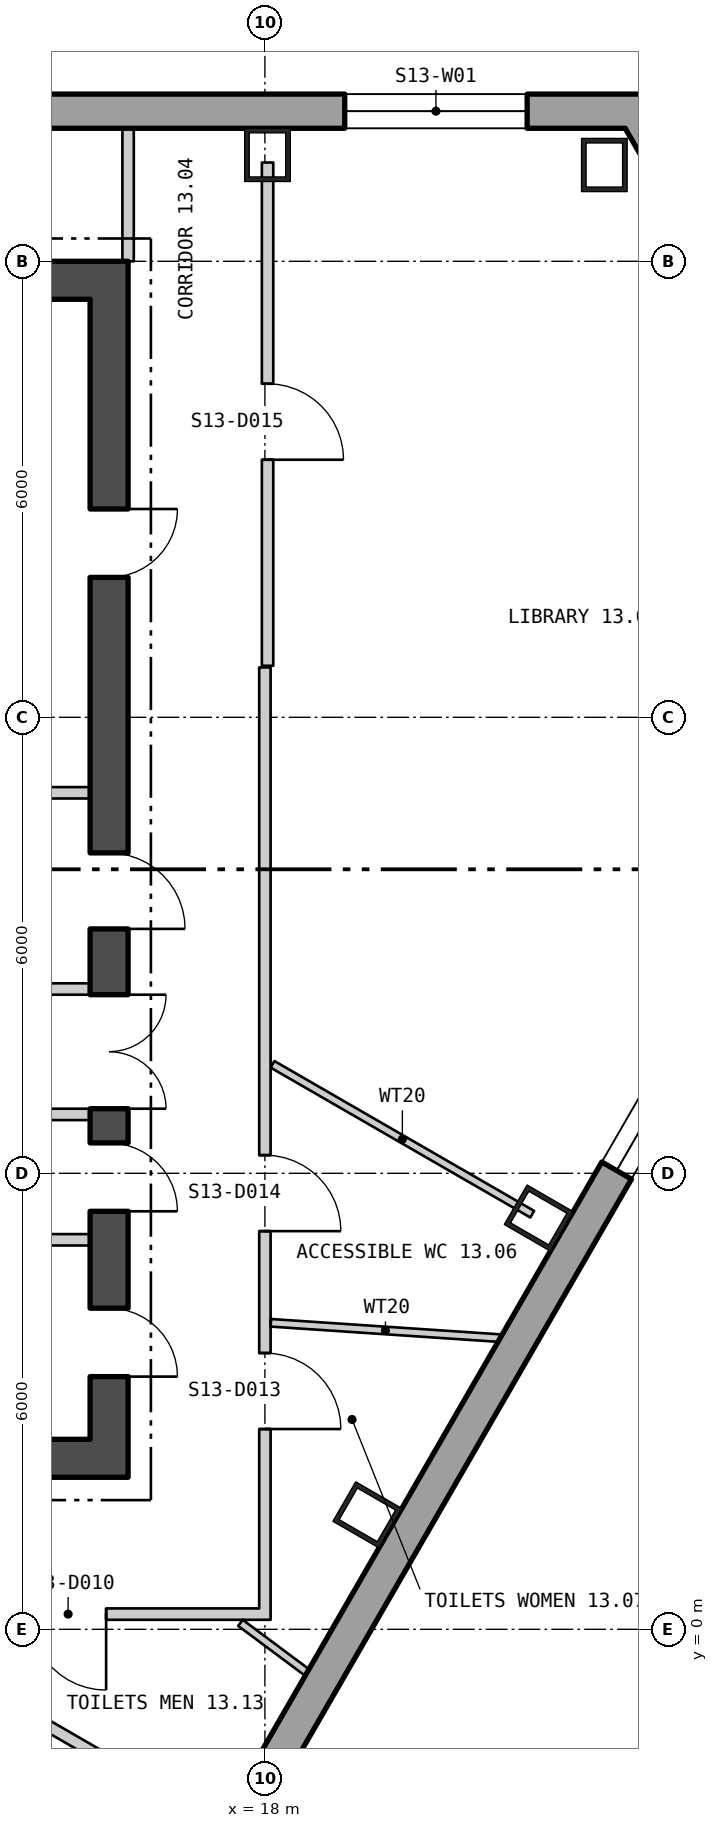
"""IFC4 building model, lengths in metres.
Left out: names, types, materials, properties, quantities, classifications, styles, units other than length and angle.
Written with IfcOpenShell. Run it as: python <this file> out.ifc"""

import sys

from ifc_helpers import new_model, si_unit, direction, frame, frame_2d, origin, origin_2d, place, context, subcontext, project, spatial, polyline, rectangle, hollow_rectangle, outline, extrude, element, fill, save


model = new_model("IFC4")
c1 = context("Model", 3, precision=1e-05, world=origin(), true_north=direction((0.0, 1.0)))
c2 = subcontext(c1, "Body", "Model", "MODEL_VIEW")
j1 = project(units=[si_unit("LENGTHUNIT", "METRE"), si_unit("PLANEANGLEUNIT", "RADIAN")], contexts=[c1])
p1 = place(None, origin())
s1 = spatial("IfcSite", under=j1, at=p1, CompositionType="ELEMENT")
p2 = place(p1, origin())
s2 = spatial("IfcBuilding", under=s1, at=p2, CompositionType="ELEMENT")
p3 = place(p2, frame((0.0, 0.0, 174.9)))
s3 = spatial("IfcBuildingStorey", under=s2, at=p3, CompositionType="ELEMENT", Elevation=174.9)
for number, where, z_axis, x_axis in (
    (1, (22.466, 19.267, 0.0), (0.0, 0.0, 1.0), (-1.0, 0.0, 0.0)),
    (2, (18.034, 19.4, 0.0), (0.0, 0.0, 1.0), (-1.0, 0.0, 0.0)),
    (3, (19.348, 1.506, 0.0), (0.0, 0.0, 1.0), (0.5, 0.866, 0.0)),
    (4, (21.603, 5.411, 0.0), (0.0, 0.0, 1.0), (0.5, 0.866, 0.0)),
):
    element("IfcColumn", number, at=place(p3, frame(where, z_axis=z_axis, x_axis=x_axis)), inside=s3, PredefinedType="COLUMN", context=c2, shape_type="SweptSolid", body=[
        extrude(hollow_rectangle(XDim=0.6, YDim=0.7, WallThickness=0.06, at=origin_2d()), origin(), (0.0, 0.0, 1.0), 3.9),
    ])
p4 = place(p3, frame((22.875, 19.975, -0.4), z_axis=(0.0, 0.0, 1.0), x_axis=(-1.0, 0.0, 0.0)))
e5 = element("IfcWall", 5, at=p4, inside=s3, PredefinedType="SOLIDWALL", context=c2, shape_type="SweptSolid", body=[
    extrude(outline(polyline([(-0.13, -0.225), (45.88, -0.225), (45.62, 0.225), (0.13, 0.225), (-0.13, -0.225)])), origin(), (0.0, 0.0, 1.0), 3.9),
])
p5 = place(p4, frame((1.425, 0.0, 1.3)))
e6 = element("IfcOpeningElement", 6, at=p5, cuts=e5, PredefinedType="OPENING", context=c2, shape_type="SweptSolid", body=[
    extrude(rectangle(XDim=2.4, YDim=2.0, at=frame_2d((1.2, 1.0))), frame((0.0, 0.235, 0.0), z_axis=(0.0, -1.0, 0.0), x_axis=(1.0, 0.0, 0.0)), (0.0, 0.0, 1.0), 0.47),
])
p6 = place(p4, frame((10.403, 0.0, 1.3)))
e7 = element("IfcOpeningElement", 7, at=p6, cuts=e5, PredefinedType="OPENING", context=c2, shape_type="SweptSolid", body=[
    extrude(rectangle(XDim=2.4, YDim=2.0, at=frame_2d((1.2, 1.0))), frame((0.0, 0.235, 0.0), z_axis=(0.0, -1.0, 0.0), x_axis=(1.0, 0.0, 0.0)), (0.0, 0.0, 1.0), 0.47),
])
p7 = place(p4, frame((14.912, 0.0, 1.3)))
e8 = element("IfcOpeningElement", 8, at=p7, cuts=e5, PredefinedType="OPENING", context=c2, shape_type="SweptSolid", body=[
    extrude(rectangle(XDim=2.4, YDim=2.0, at=frame_2d((1.2, 1.0))), frame((0.0, 0.235, 0.0), z_axis=(0.0, -1.0, 0.0), x_axis=(1.0, 0.0, 0.0)), (0.0, 0.0, 1.0), 0.47),
])
p8 = place(p4, frame((19.421, 0.0, 1.3)))
e9 = element("IfcOpeningElement", 9, at=p8, cuts=e5, PredefinedType="OPENING", context=c2, shape_type="SweptSolid", body=[
    extrude(rectangle(XDim=2.4, YDim=2.0, at=frame_2d((1.2, 1.0))), frame((0.0, 0.235, 0.0), z_axis=(0.0, -1.0, 0.0), x_axis=(1.0, 0.0, 0.0)), (0.0, 0.0, 1.0), 0.47),
])
p9 = place(p4, frame((23.929, 0.0, 1.3)))
e10 = element("IfcOpeningElement", 10, at=p9, cuts=e5, PredefinedType="OPENING", context=c2, shape_type="SweptSolid", body=[
    extrude(rectangle(XDim=2.4, YDim=2.0, at=frame_2d((1.2, 1.0))), frame((0.0, 0.235, 0.0), z_axis=(0.0, -1.0, 0.0), x_axis=(1.0, 0.0, 0.0)), (0.0, 0.0, 1.0), 0.47),
])
p10 = place(p4, frame((28.438, 0.0, 1.3)))
e11 = element("IfcOpeningElement", 11, at=p10, cuts=e5, PredefinedType="OPENING", context=c2, shape_type="SweptSolid", body=[
    extrude(rectangle(XDim=2.4, YDim=2.0, at=frame_2d((1.2, 1.0))), frame((0.0, 0.235, 0.0), z_axis=(0.0, -1.0, 0.0), x_axis=(1.0, 0.0, 0.0)), (0.0, 0.0, 1.0), 0.47),
])
p11 = place(p4, frame((32.947, 0.0, 1.3)))
e12 = element("IfcOpeningElement", 12, at=p11, cuts=e5, PredefinedType="OPENING", context=c2, shape_type="SweptSolid", body=[
    extrude(rectangle(XDim=2.4, YDim=2.0, at=frame_2d((1.2, 1.0))), frame((0.0, 0.235, 0.0), z_axis=(0.0, -1.0, 0.0), x_axis=(1.0, 0.0, 0.0)), (0.0, 0.0, 1.0), 0.47),
])
p12 = place(p4, frame((37.455, 0.0, 1.3)))
e13 = element("IfcOpeningElement", 13, at=p12, cuts=e5, PredefinedType="OPENING", context=c2, shape_type="SweptSolid", body=[
    extrude(rectangle(XDim=2.4, YDim=2.0, at=frame_2d((1.2, 1.0))), frame((0.0, 0.235, 0.0), z_axis=(0.0, -1.0, 0.0), x_axis=(1.0, 0.0, 0.0)), (0.0, 0.0, 1.0), 0.47),
])
p13 = place(p4, frame((41.925, 0.0, 1.3)))
e14 = element("IfcOpeningElement", 14, at=p13, cuts=e5, PredefinedType="OPENING", context=c2, shape_type="SweptSolid", body=[
    extrude(rectangle(XDim=2.4, YDim=2.0, at=frame_2d((1.2, 1.0))), frame((0.0, 0.235, 0.0), z_axis=(0.0, -1.0, 0.0), x_axis=(1.0, 0.0, 0.0)), (0.0, 0.0, 1.0), 0.47),
])
p14 = place(p3, frame((3.9, -26.401, -0.18), z_axis=(0.0, 0.0, 1.0), x_axis=(0.500000335318, 0.866025210188, 0.0)))
e15 = element("IfcWall", 15, at=p14, inside=s3, PredefinedType="SOLIDWALL", context=c2, shape_type="SweptSolid", body=[
    extrude(outline(polyline([(-0.13, -0.225), (45.88, -0.225), (45.62, 0.225), (0.13, 0.225), (-0.13, -0.225)])), origin(), (0.0, 0.0, 1.0), 3.68),
])
p15 = place(p14, frame((1.425, 0.0, 1.08)))
e16 = element("IfcOpeningElement", 16, at=p15, cuts=e15, PredefinedType="OPENING", context=c2, shape_type="SweptSolid", body=[
    extrude(rectangle(XDim=2.4, YDim=2.0, at=frame_2d((1.2, 1.0))), frame((0.0, 0.235, 0.0), z_axis=(0.0, -1.0, 0.0), x_axis=(1.0, 0.0, 0.0)), (0.0, 0.0, 1.0), 0.47),
])
p16 = place(p14, frame((5.895, 0.0, 1.08)))
e17 = element("IfcOpeningElement", 17, at=p16, cuts=e15, PredefinedType="OPENING", context=c2, shape_type="SweptSolid", body=[
    extrude(rectangle(XDim=2.4, YDim=2.0, at=frame_2d((1.2, 1.0))), frame((0.0, 0.235, 0.0), z_axis=(0.0, -1.0, 0.0), x_axis=(1.0, 0.0, 0.0)), (0.0, 0.0, 1.0), 0.47),
])
p17 = place(p14, frame((10.403, 0.0, 1.08)))
e18 = element("IfcOpeningElement", 18, at=p17, cuts=e15, PredefinedType="OPENING", context=c2, shape_type="SweptSolid", body=[
    extrude(rectangle(XDim=2.4, YDim=2.0, at=frame_2d((1.2, 1.0))), frame((0.0, 0.235, 0.0), z_axis=(0.0, -1.0, 0.0), x_axis=(1.0, 0.0, 0.0)), (0.0, 0.0, 1.0), 0.47),
])
p18 = place(p14, frame((14.912, 0.0, 1.08)))
e19 = element("IfcOpeningElement", 19, at=p18, cuts=e15, PredefinedType="OPENING", context=c2, shape_type="SweptSolid", body=[
    extrude(rectangle(XDim=2.4, YDim=2.0, at=frame_2d((1.2, 1.0))), frame((0.0, 0.235, 0.0), z_axis=(0.0, -1.0, 0.0), x_axis=(1.0, 0.0, 0.0)), (0.0, 0.0, 1.0), 0.47),
])
p19 = place(p14, frame((19.421, 0.0, 1.08)))
e20 = element("IfcOpeningElement", 20, at=p19, cuts=e15, PredefinedType="OPENING", context=c2, shape_type="SweptSolid", body=[
    extrude(rectangle(XDim=2.4, YDim=2.0, at=frame_2d((1.2, 1.0))), frame((0.0, 0.235, 0.0), z_axis=(0.0, -1.0, 0.0), x_axis=(1.0, 0.0, 0.0)), (0.0, 0.0, 1.0), 0.47),
])
p20 = place(p14, frame((23.929, 0.0, 1.08)))
e21 = element("IfcOpeningElement", 21, at=p20, cuts=e15, PredefinedType="OPENING", context=c2, shape_type="SweptSolid", body=[
    extrude(rectangle(XDim=2.4, YDim=2.0, at=frame_2d((1.2, 1.0))), frame((0.0, 0.235, 0.0), z_axis=(0.0, -1.0, 0.0), x_axis=(1.0, 0.0, 0.0)), (0.0, 0.0, 1.0), 0.47),
])
p21 = place(p14, frame((37.455, 0.0, 1.08)))
e22 = element("IfcOpeningElement", 22, at=p21, cuts=e15, PredefinedType="OPENING", context=c2, shape_type="SweptSolid", body=[
    extrude(rectangle(XDim=2.4, YDim=2.0, at=frame_2d((1.2, 1.0))), frame((0.0, 0.235, 0.0), z_axis=(0.0, -1.0, 0.0), x_axis=(1.0, 0.0, 0.0)), (0.0, 0.0, 1.0), 0.47),
])
p22 = place(p14, frame((41.925, 0.0, 1.08)))
e23 = element("IfcOpeningElement", 23, at=p22, cuts=e15, PredefinedType="OPENING", context=c2, shape_type="SweptSolid", body=[
    extrude(rectangle(XDim=2.4, YDim=2.0, at=frame_2d((1.2, 1.0))), frame((0.0, 0.235, 0.0), z_axis=(0.0, -1.0, 0.0), x_axis=(1.0, 0.0, 0.0)), (0.0, 0.0, 1.0), 0.47),
])
p23 = place(p3, frame((26.771, 13.218, -0.4), z_axis=(0.0, 0.0, 1.0), x_axis=(-0.500003961136, 0.86602311681, 0.0)))
e24 = element("IfcWall", 24, at=p23, inside=s3, PredefinedType="SOLIDWALL", context=c2, shape_type="SweptSolid", body=[
    extrude(outline(polyline([(-0.13, -0.225), (7.93, -0.225), (7.67, 0.225), (0.13, 0.225), (-0.13, -0.225)])), origin(), (0.0, 0.0, 1.0), 3.9),
])
p24 = place(p23, frame((1.254, 0.0, 1.3)))
e25 = element("IfcOpeningElement", 25, at=p24, cuts=e24, PredefinedType="OPENING", context=c2, shape_type="SweptSolid", body=[
    extrude(rectangle(XDim=1.8, YDim=2.0, at=frame_2d((0.9, 1.0))), frame((0.0, 0.235, 0.0), z_axis=(0.0, -1.0, 0.0), x_axis=(1.0, 0.0, 0.0)), (0.0, 0.0, 1.0), 0.47),
])
p25 = place(p23, frame((4.746, 0.0, 1.3)))
e26 = element("IfcOpeningElement", 26, at=p25, cuts=e24, PredefinedType="OPENING", context=c2, shape_type="SweptSolid", body=[
    extrude(rectangle(XDim=1.8, YDim=2.0, at=frame_2d((0.9, 1.0))), frame((0.0, 0.235, 0.0), z_axis=(0.0, -1.0, 0.0), x_axis=(1.0, 0.0, 0.0)), (0.0, 0.0, 1.0), 0.47),
])
p26 = place(p3, frame((-16.2, 2.25, 0.0), z_axis=(0.0, 0.0, 1.0), x_axis=(1.0, 0.0, 0.0)))
e27 = element("IfcWall", 27, at=p26, inside=s3, PredefinedType="SHEAR", context=c2, shape_type="SweptSolid", body=[
    extrude(rectangle(XDim=32.4, YDim=0.5, at=frame_2d((16.2, 0.0))), origin(), (0.0, 0.0, 1.0), 3.7),
])
p27 = place(p26, frame((10.7, 0.0, 0.0)))
e28 = element("IfcOpeningElement", 28, at=p27, cuts=e27, PredefinedType="OPENING", context=c2, shape_type="SweptSolid", body=[
    extrude(rectangle(XDim=1.8, YDim=2.4, at=frame_2d((0.9, 1.2))), frame((0.0, 0.26, 0.0), z_axis=(0.0, -1.0, 0.0), x_axis=(1.0, 0.0, 0.0)), (0.0, 0.0, 1.0), 0.52),
])
p28 = place(p26, frame((20.7, 0.0, 0.0)))
e29 = element("IfcOpeningElement", 29, at=p28, cuts=e27, PredefinedType="OPENING", context=c2, shape_type="SweptSolid", body=[
    extrude(rectangle(XDim=1.8, YDim=2.4, at=frame_2d((0.9, 1.2))), frame((0.0, 0.26, 0.0), z_axis=(0.0, -1.0, 0.0), x_axis=(1.0, 0.0, 0.0)), (0.0, 0.0, 1.0), 0.52),
])
p29 = place(p3, frame((-16.2, 17.75, 0.0), z_axis=(0.0, 0.0, 1.0), x_axis=(1.0, 0.0, 0.0)))
e30 = element("IfcWall", 30, at=p29, inside=s3, PredefinedType="SHEAR", context=c2, shape_type="SweptSolid", body=[
    extrude(rectangle(XDim=32.4, YDim=0.5, at=frame_2d((16.2, 0.0))), origin(), (0.0, 0.0, 1.0), 3.7),
])
p30 = place(p3, frame((15.95, 2.5, 0.0), z_axis=(0.0, 0.0, 1.0), x_axis=(0.0, 1.0, 0.0)))
e31 = element("IfcWall", 31, at=p30, inside=s3, PredefinedType="SHEAR", context=c2, shape_type="SweptSolid", body=[
    extrude(rectangle(XDim=15.0, YDim=0.5, at=frame_2d((7.5, 0.0))), origin(), (0.0, 0.0, 1.0), 3.7),
])
p31 = place(p30, frame((4.35, 0.0, 0.0)))
e32 = element("IfcOpeningElement", 32, at=p31, cuts=e31, PredefinedType="OPENING", context=c2, shape_type="SweptSolid", body=[
    extrude(rectangle(XDim=1.5, YDim=2.1, at=frame_2d((0.75, 1.05))), frame((0.0, 0.26, 0.0), z_axis=(0.0, -1.0, 0.0), x_axis=(1.0, 0.0, 0.0)), (0.0, 0.0, 1.0), 0.52),
])
p32 = place(p30, frame((0.825, 0.0, 0.0)))
e33 = element("IfcOpeningElement", 33, at=p32, cuts=e31, PredefinedType="OPENING", context=c2, shape_type="SweptSolid", body=[
    extrude(rectangle(XDim=0.9, YDim=2.1, at=frame_2d((0.45, 1.05))), frame((0.0, 0.26, 0.0), z_axis=(0.0, -1.0, 0.0), x_axis=(1.0, 0.0, 0.0)), (0.0, 0.0, 1.0), 0.52),
])
p33 = place(p30, frame((3.0, 0.0, 0.0)))
e34 = element("IfcOpeningElement", 34, at=p33, cuts=e31, PredefinedType="OPENING", context=c2, shape_type="SweptSolid", body=[
    extrude(rectangle(XDim=0.9, YDim=2.1, at=frame_2d((0.45, 1.05))), frame((0.0, 0.26, 0.0), z_axis=(0.0, -1.0, 0.0), x_axis=(1.0, 0.0, 0.0)), (0.0, 0.0, 1.0), 0.52),
])
p34 = place(p30, frame((6.716, 0.0, 0.0)))
e35 = element("IfcOpeningElement", 35, at=p34, cuts=e31, PredefinedType="OPENING", context=c2, shape_type="SweptSolid", body=[
    extrude(rectangle(XDim=1.0, YDim=2.1, at=frame_2d((0.5, 1.05))), frame((0.0, 0.26, 0.0), z_axis=(0.0, -1.0, 0.0), x_axis=(1.0, 0.0, 0.0)), (0.0, 0.0, 1.0), 0.52),
])
p35 = place(p30, frame((11.341, 0.0, 0.0)))
e36 = element("IfcOpeningElement", 36, at=p35, cuts=e31, PredefinedType="OPENING", context=c2, shape_type="SweptSolid", body=[
    extrude(rectangle(XDim=0.9, YDim=2.1, at=frame_2d((0.45, 1.05))), frame((0.0, 0.26, 0.0), z_axis=(0.0, -1.0, 0.0), x_axis=(1.0, 0.0, 0.0)), (0.0, 0.0, 1.0), 0.52),
])
for number, where, z_axis, x_axis in (
    (37, (14.5, 6.775, 0.0), (0.0, 0.0, 1.0), (1.0, 0.0, 0.0)),
    (38, (14.5, 8.425, 0.0), (0.0, 0.0, 1.0), (1.0, 0.0, 0.0)),
    (39, (14.5, 5.125, 0.0), (0.0, 0.0, 1.0), (1.0, 0.0, 0.0)),
    (40, (14.5, 11.007, 0.0), (0.0, 0.0, 1.0), (1.0, 0.0, 0.0)),
):
    element("IfcWall", number, at=place(p3, frame(where, z_axis=z_axis, x_axis=x_axis)), inside=s3, PredefinedType="PARTITIONING", context=c2, shape_type="SweptSolid", body=[
        extrude(rectangle(XDim=1.2, YDim=0.15, at=frame_2d((0.6, 0.0))), origin(), (0.0, 0.0, 1.0), 3.7),
    ])
p36 = place(p3, frame((7.02, 0.2, 0.0), z_axis=(0.0, 0.0, 1.0), x_axis=(1.0, 0.0, 0.0)))
e41 = element("IfcWall", 41, at=p36, inside=s3, PredefinedType="PARTITIONING", context=c2, shape_type="SweptSolid", body=[
    extrude(rectangle(XDim=10.905, YDim=0.15, at=frame_2d((5.452, 0.0))), origin(), (0.0, 0.0, 1.0), 3.7),
])
p37 = place(p36, frame((7.891, 0.0, 0.0)))
e42 = element("IfcOpeningElement", 42, at=p37, cuts=e41, PredefinedType="OPENING", context=c2, shape_type="SweptSolid", body=[
    extrude(rectangle(XDim=1.0, YDim=2.1, at=frame_2d((0.5, 1.05))), frame((0.0, 0.085, 0.0), z_axis=(0.0, -1.0, 0.0), x_axis=(1.0, 0.0, 0.0)), (0.0, 0.0, 1.0), 0.17),
])
p38 = place(p3, frame((12.836, 0.06, 0.0), z_axis=(0.0, 0.0, 1.0), x_axis=(0.866088799389, -0.499890179513, 0.0)))
e43 = element("IfcWall", 43, at=p38, inside=s3, PredefinedType="PARTITIONING", context=c2, shape_type="SweptSolid", body=[
    extrude(rectangle(XDim=4.817, YDim=0.15, at=frame_2d((2.409, 0.0))), origin(), (0.0, 0.0, 1.0), 3.7),
])
p39 = place(p3, frame((16.2, 18.0, 0.0), z_axis=(0.0, 0.0, 1.0), x_axis=(0.0, 1.0, 0.0)))
e44 = element("IfcWall", 44, at=p39, inside=s3, PredefinedType="PARTITIONING", context=c2, shape_type="SweptSolid", body=[
    extrude(rectangle(XDim=1.75, YDim=0.15, at=frame_2d((0.875, 0.0))), origin(), (0.0, 0.0, 1.0), 3.7),
])
p40 = place(p3, frame((17.678, 0.085, 0.0), z_axis=(0.0, 0.0, 1.0), x_axis=(0.8020803948, -0.597216075033, 0.0)))
e45 = element("IfcWall", 45, at=p40, inside=s3, PredefinedType="PARTITIONING", context=c2, shape_type="SweptSolid", body=[
    extrude(rectangle(XDim=1.093, YDim=0.1, at=frame_2d((0.547, 0.0))), origin(), (0.0, 0.0, 1.0), 3.7),
])
p41 = place(p3, frame((18.0, 0.125, 0.0), z_axis=(0.0, 0.0, 1.0), x_axis=(0.0, 1.0, 0.0)))
e46 = element("IfcWall", 46, at=p41, inside=s3, PredefinedType="PARTITIONING", context=c2, shape_type="SweptSolid", body=[
    extrude(rectangle(XDim=12.531, YDim=0.15, at=frame_2d((6.266, 0.0))), origin(), (0.0, 0.0, 1.0), 3.7),
])
p42 = place(p41, frame((2.51, 0.0, 0.0)))
e47 = element("IfcOpeningElement", 47, at=p42, cuts=e46, PredefinedType="OPENING", context=c2, shape_type="SweptSolid", body=[
    extrude(rectangle(XDim=1.0, YDim=2.1, at=frame_2d((0.5, 1.05))), frame((0.0, 0.085, 0.0), z_axis=(0.0, -1.0, 0.0), x_axis=(1.0, 0.0, 0.0)), (0.0, 0.0, 1.0), 0.17),
])
p43 = place(p41, frame((5.114, 0.0, 0.0)))
e48 = element("IfcOpeningElement", 48, at=p43, cuts=e46, PredefinedType="OPENING", context=c2, shape_type="SweptSolid", body=[
    extrude(rectangle(XDim=1.0, YDim=2.1, at=frame_2d((0.5, 1.05))), frame((0.0, 0.085, 0.0), z_axis=(0.0, -1.0, 0.0), x_axis=(1.0, 0.0, 0.0)), (0.0, 0.0, 1.0), 0.17),
])
p44 = place(p3, frame((18.035, 12.678, 0.0), z_axis=(0.0, 0.0, 1.0), x_axis=(0.0, 1.0, 0.0)))
e49 = element("IfcWall", 49, at=p44, inside=s3, PredefinedType="PARTITIONING", context=c2, shape_type="SweptSolid", body=[
    extrude(rectangle(XDim=6.622, YDim=0.15, at=frame_2d((3.311, 0.0))), origin(), (0.0, 0.0, 1.0), 3.7),
])
p45 = place(p44, frame((2.711, 0.0, 0.0)))
e50 = element("IfcOpeningElement", 50, at=p45, cuts=e49, PredefinedType="OPENING", context=c2, shape_type="SweptSolid", body=[
    extrude(rectangle(XDim=1.0, YDim=2.1, at=frame_2d((0.5, 1.05))), frame((0.0, 0.085, 0.0), z_axis=(0.0, -1.0, 0.0), x_axis=(1.0, 0.0, 0.0)), (0.0, 0.0, 1.0), 0.17),
])
p46 = place(p3, frame((18.078, 4.033, 0.0), z_axis=(0.0, 0.0, 1.0), x_axis=(0.997764616993, -0.066826410024, 0.0)))
e51 = element("IfcWall", 51, at=p46, inside=s3, PredefinedType="PARTITIONING", context=c2, shape_type="SweptSolid", body=[
    extrude(rectangle(XDim=3.023, YDim=0.1, at=frame_2d((1.511, 0.0))), origin(), (0.0, 0.0, 1.0), 3.7),
])
p47 = place(p3, frame((18.1, 7.434, 0.0), z_axis=(0.0, 0.0, 1.0), x_axis=(0.866113839764, -0.499846793097, 0.0)))
e52 = element("IfcWall", 52, at=p47, inside=s3, PredefinedType="PARTITIONING", context=c2, shape_type="SweptSolid", body=[
    extrude(rectangle(XDim=3.945, YDim=0.1, at=frame_2d((1.973, 0.0))), origin(), (0.0, 0.0, 1.0), 3.7),
])
p48 = place(p5, origin())
e53 = element("IfcWindow", 53, at=p48, inside=s3, PartitioningType="SINGLE_PANEL", PredefinedType="WINDOW", context=c2, shape_type="SweptSolid", body=[
    extrude(rectangle(XDim=2.4, YDim=2.0, at=frame_2d((1.2, 1.0))), frame((0.0, 0.105, 0.0), z_axis=(0.0, -1.0, 0.0), x_axis=(1.0, 0.0, 0.0)), (0.0, 0.0, 1.0), 0.06),
])
fill(e6, e53)
p49 = place(p21, origin())
e54 = element("IfcWindow", 54, at=p49, inside=s3, PartitioningType="SINGLE_PANEL", PredefinedType="WINDOW", context=c2, shape_type="SweptSolid", body=[
    extrude(rectangle(XDim=2.4, YDim=2.0, at=frame_2d((1.2, 1.0))), frame((0.0, 0.105, 0.0), z_axis=(0.0, -1.0, 0.0), x_axis=(1.0, 0.0, 0.0)), (0.0, 0.0, 1.0), 0.06),
])
fill(e22, e54)
p50 = place(p31, origin())
e55 = element("IfcDoor", 55, at=p50, inside=s3, OperationType="DOUBLE_DOOR_SINGLE_SWING", PredefinedType="DOOR", context=c2, shape_type="SweptSolid", body=[
    extrude(rectangle(XDim=1.5, YDim=2.1, at=frame_2d((0.75, 1.05))), frame((0.0, 0.025, 0.0), z_axis=(0.0, -1.0, 0.0), x_axis=(1.0, 0.0, 0.0)), (0.0, 0.0, 1.0), 0.05),
])
fill(e32, e55)
p51 = place(p32, origin())
e56 = element("IfcDoor", 56, at=p51, inside=s3, OperationType="SINGLE_SWING_LEFT", PredefinedType="DOOR", context=c2, shape_type="SweptSolid", body=[
    extrude(rectangle(XDim=0.9, YDim=2.1, at=frame_2d((0.45, 1.05))), frame((0.0, 0.025, 0.0), z_axis=(0.0, -1.0, 0.0), x_axis=(1.0, 0.0, 0.0)), (0.0, 0.0, 1.0), 0.05),
])
fill(e33, e56)
p52 = place(p33, origin())
e57 = element("IfcDoor", 57, at=p52, inside=s3, OperationType="SINGLE_SWING_LEFT", PredefinedType="DOOR", context=c2, shape_type="SweptSolid", body=[
    extrude(rectangle(XDim=0.9, YDim=2.1, at=frame_2d((0.45, 1.05))), frame((0.0, 0.025, 0.0), z_axis=(0.0, -1.0, 0.0), x_axis=(1.0, 0.0, 0.0)), (0.0, 0.0, 1.0), 0.05),
])
fill(e34, e57)
p53 = place(p34, origin())
e58 = element("IfcDoor", 58, at=p53, inside=s3, OperationType="SINGLE_SWING_LEFT", PredefinedType="DOOR", context=c2, shape_type="SweptSolid", body=[
    extrude(rectangle(XDim=1.0, YDim=2.1, at=frame_2d((0.5, 1.05))), frame((0.0, 0.025, 0.0), z_axis=(0.0, -1.0, 0.0), x_axis=(1.0, 0.0, 0.0)), (0.0, 0.0, 1.0), 0.05),
])
fill(e35, e58)
p54 = place(p35, origin())
e59 = element("IfcDoor", 59, at=p54, inside=s3, OperationType="SINGLE_SWING_RIGHT", PredefinedType="DOOR", context=c2, shape_type="SweptSolid", body=[
    extrude(rectangle(XDim=0.9, YDim=2.1, at=frame_2d((0.45, 1.05))), frame((0.0, 0.025, 0.0), z_axis=(0.0, -1.0, 0.0), x_axis=(1.0, 0.0, 0.0)), (0.0, 0.0, 1.0), 0.05),
])
fill(e36, e59)
p55 = place(p37, origin())
e60 = element("IfcDoor", 60, at=p55, inside=s3, OperationType="SINGLE_SWING_RIGHT", PredefinedType="DOOR", context=c2, shape_type="SweptSolid", body=[
    extrude(rectangle(XDim=1.0, YDim=2.1, at=frame_2d((0.5, 1.05))), frame((0.0, 0.025, 0.0), z_axis=(0.0, -1.0, 0.0), x_axis=(1.0, 0.0, 0.0)), (0.0, 0.0, 1.0), 0.05),
])
fill(e42, e60)
p56 = place(p42, origin())
e61 = element("IfcDoor", 61, at=p56, inside=s3, OperationType="SINGLE_SWING_LEFT", PredefinedType="DOOR", context=c2, shape_type="SweptSolid", body=[
    extrude(rectangle(XDim=1.0, YDim=2.1, at=frame_2d((0.5, 1.05))), frame((0.0, 0.025, 0.0), z_axis=(0.0, -1.0, 0.0), x_axis=(1.0, 0.0, 0.0)), (0.0, 0.0, 1.0), 0.05),
])
fill(e47, e61)
p57 = place(p43, origin())
e62 = element("IfcDoor", 62, at=p57, inside=s3, OperationType="SINGLE_SWING_LEFT", PredefinedType="DOOR", context=c2, shape_type="SweptSolid", body=[
    extrude(rectangle(XDim=1.0, YDim=2.1, at=frame_2d((0.5, 1.05))), frame((0.0, 0.025, 0.0), z_axis=(0.0, -1.0, 0.0), x_axis=(1.0, 0.0, 0.0)), (0.0, 0.0, 1.0), 0.05),
])
fill(e48, e62)
p58 = place(p45, origin())
e63 = element("IfcDoor", 63, at=p58, inside=s3, OperationType="SINGLE_SWING_LEFT", PredefinedType="DOOR", context=c2, shape_type="SweptSolid", body=[
    extrude(rectangle(XDim=1.0, YDim=2.1, at=frame_2d((0.5, 1.05))), frame((0.0, 0.025, 0.0), z_axis=(0.0, -1.0, 0.0), x_axis=(1.0, 0.0, 0.0)), (0.0, 0.0, 1.0), 0.05),
])
fill(e50, e63)
save(model, sys.argv[1])
